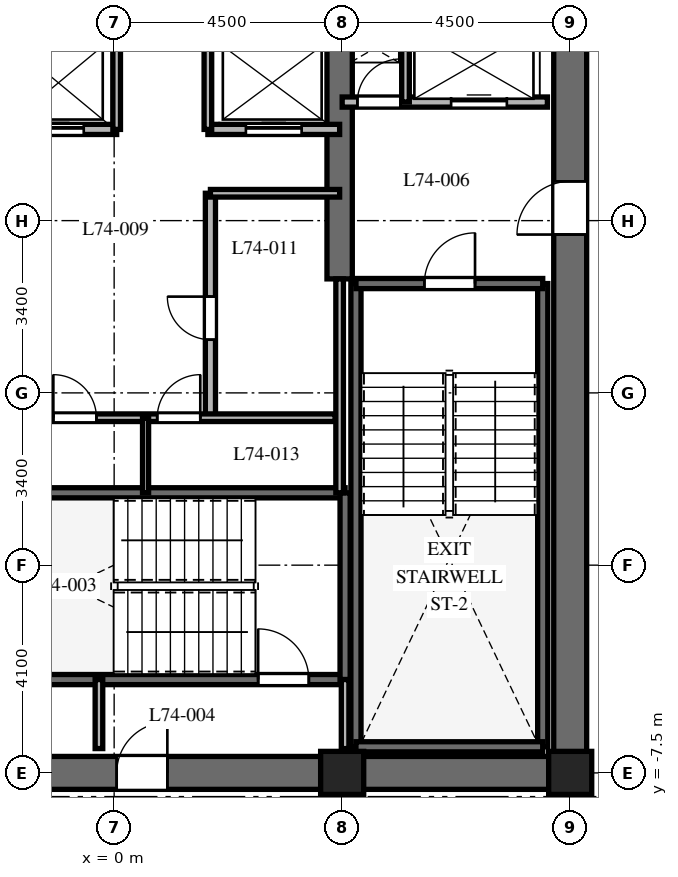
"""IFC4 building model, lengths in metres.
Left out: names, types, materials, properties, quantities, classifications, styles, units other than length and angle.
Written with IfcOpenShell. Run it as: python <this file> out.ifc"""

import sys

from ifc_helpers import new_model, si_unit, direction, frame, frame_2d, origin, origin_2d, place, context, subcontext, project, spatial, rectangle, extrude, element, fill, save


model = new_model("IFC4")
c1 = context("Model", 3, precision=1e-05, world=origin(), true_north=direction((0.0, 1.0)))
c2 = subcontext(c1, "Body", "Model", "MODEL_VIEW")
j1 = project(units=[si_unit("LENGTHUNIT", "METRE"), si_unit("PLANEANGLEUNIT", "RADIAN")], contexts=[c1])
p1 = place(None, origin())
s1 = spatial("IfcSite", under=j1, at=p1, CompositionType="ELEMENT")
p2 = place(p1, origin())
s2 = spatial("IfcBuilding", under=s1, at=p2, CompositionType="ELEMENT")
p3 = place(p2, frame((0.0, 0.0, 297.6)))
s3 = spatial("IfcBuildingStorey", under=s2, at=p3, CompositionType="ELEMENT", Elevation=297.6)
p4 = place(p3, frame((-9.325, -7.5, 0.0), z_axis=(0.0, 0.0, 1.0), x_axis=(1.0, 0.0, 0.0)))
e1 = element("IfcWall", 1, at=p4, inside=s3, PredefinedType="SHEAR", context=c2, shape_type="SweptSolid", body=[
    extrude(rectangle(XDim=18.65, YDim=0.65, at=frame_2d((9.325, 0.0))), origin(), (0.0, 0.0, 1.0), 3.9),
])
p5 = place(p4, frame((9.375, 0.0, 0.0)))
e2 = element("IfcOpeningElement", 2, at=p5, cuts=e1, PredefinedType="OPENING", context=c2, shape_type="SweptSolid", body=[
    extrude(rectangle(XDim=1.0, YDim=2.15, at=frame_2d((0.5, 1.075))), frame((0.0, 0.335, 0.0), z_axis=(0.0, -1.0, 0.0), x_axis=(1.0, 0.0, 0.0)), (0.0, 0.0, 1.0), 0.67),
])
p6 = place(p3, frame((9.0, -7.175, 0.0), z_axis=(0.0, 0.0, 1.0), x_axis=(0.0, 1.0, 0.0)))
e3 = element("IfcWall", 3, at=p6, inside=s3, PredefinedType="SHEAR", context=c2, shape_type="SweptSolid", body=[
    extrude(rectangle(XDim=14.35, YDim=0.65, at=frame_2d((7.175, 0.0))), origin(), (0.0, 0.0, 1.0), 3.9),
])
p7 = place(p6, frame((10.3, 0.0, 0.0)))
e4 = element("IfcOpeningElement", 4, at=p7, cuts=e3, PredefinedType="OPENING", context=c2, shape_type="SweptSolid", body=[
    extrude(rectangle(XDim=1.05, YDim=2.15, at=frame_2d((0.525, 1.075))), frame((0.0, 0.335, 0.0), z_axis=(0.0, -1.0, 0.0), x_axis=(1.0, 0.0, 0.0)), (0.0, 0.0, 1.0), 0.67),
])
p8 = place(p3, frame((4.45, 2.25, 0.0), z_axis=(0.0, 0.0, 1.0), x_axis=(0.0, 1.0, 0.0)))
e5 = element("IfcWall", 5, at=p8, inside=s3, PredefinedType="SHEAR", context=c2, shape_type="SweptSolid", body=[
    extrude(rectangle(XDim=4.925, YDim=0.5, at=frame_2d((2.462, 0.0))), origin(), (0.0, 0.0, 1.0), 3.9),
])
for number, where, z_axis, x_axis in (
    (6, (4.772, -6.985, 0.0), (0.0, 0.0, 1.0), (0.0, 1.0, 0.0)),
    (7, (8.458, -6.985, 0.0), (0.0, 0.0, 1.0), (0.0, 1.0, 0.0)),
):
    element("IfcWall", number, at=place(p3, frame(where, z_axis=z_axis, x_axis=x_axis)), inside=s3, PredefinedType="SHEAR", context=c2, shape_type="SweptSolid", body=[
        extrude(rectangle(XDim=9.143, YDim=0.2, at=frame_2d((4.572, 0.0))), origin(), (0.0, 0.0, 1.0), 3.9),
    ])
p9 = place(p3, frame((4.772, -6.985, 0.0), z_axis=(0.0, 0.0, 1.0), x_axis=(1.0, 0.0, 0.0)))
e8 = element("IfcWall", 8, at=p9, inside=s3, PredefinedType="SHEAR", context=c2, shape_type="SweptSolid", body=[
    extrude(rectangle(XDim=3.686, YDim=0.2, at=frame_2d((1.843, 0.0))), origin(), (0.0, 0.0, 1.0), 3.9),
])
p10 = place(p3, frame((4.772, 2.158, 0.0), z_axis=(0.0, 0.0, 1.0), x_axis=(1.0, 0.0, 0.0)))
e9 = element("IfcWall", 9, at=p10, inside=s3, PredefinedType="SHEAR", context=c2, shape_type="SweptSolid", body=[
    extrude(rectangle(XDim=3.686, YDim=0.2, at=frame_2d((1.843, 0.0))), origin(), (0.0, 0.0, 1.0), 3.9),
])
p11 = place(p10, frame((1.35, 0.0, 0.0)))
e10 = element("IfcOpeningElement", 10, at=p11, cuts=e9, PredefinedType="OPENING", context=c2, shape_type="SweptSolid", body=[
    extrude(rectangle(XDim=1.0, YDim=2.15, at=frame_2d((0.5, 1.075))), frame((0.0, 0.11, 0.0), z_axis=(0.0, -1.0, 0.0), x_axis=(1.0, 0.0, 0.0)), (0.0, 0.0, 1.0), 0.22),
])
p12 = place(p3, frame((-4.608, -5.658, 0.0), z_axis=(0.0, 0.0, 1.0), x_axis=(1.0, 0.0, 0.0)))
e11 = element("IfcWall", 11, at=p12, inside=s3, PredefinedType="SHEAR", context=c2, shape_type="SweptSolid", body=[
    extrude(rectangle(XDim=9.166, YDim=0.2, at=frame_2d((4.583, 0.0))), origin(), (0.0, 0.0, 1.0), 3.9),
])
p13 = place(p12, frame((7.45, 0.0, 0.0)))
e12 = element("IfcOpeningElement", 12, at=p13, cuts=e11, PredefinedType="OPENING", context=c2, shape_type="SweptSolid", body=[
    extrude(rectangle(XDim=1.0, YDim=2.15, at=frame_2d((0.5, 1.075))), frame((0.0, 0.11, 0.0), z_axis=(0.0, -1.0, 0.0), x_axis=(1.0, 0.0, 0.0)), (0.0, 0.0, 1.0), 0.22),
])
p14 = place(p3, frame((-4.608, -1.972, 0.0), z_axis=(0.0, 0.0, 1.0), x_axis=(1.0, 0.0, 0.0)))
e13 = element("IfcWall", 13, at=p14, inside=s3, PredefinedType="SHEAR", context=c2, shape_type="SweptSolid", body=[
    extrude(rectangle(XDim=9.166, YDim=0.2, at=frame_2d((4.583, 0.0))), origin(), (0.0, 0.0, 1.0), 3.9),
])
p15 = place(p3, frame((4.558, -5.658, 0.0), z_axis=(0.0, 0.0, 1.0), x_axis=(0.0, 1.0, 0.0)))
e14 = element("IfcWall", 14, at=p15, inside=s3, PredefinedType="SHEAR", context=c2, shape_type="SweptSolid", body=[
    extrude(rectangle(XDim=3.686, YDim=0.2, at=frame_2d((1.843, 0.0))), origin(), (0.0, 0.0, 1.0), 3.9),
])
for number, where, z_axis, x_axis in (
    (15, (4.5, -7.5, 0.0), (0.0, 0.0, 1.0), (1.0, 0.0, 0.0)),
    (16, (9.0, -7.5, 0.0), (0.0, 0.0, 1.0), (1.0, 0.0, 0.0)),
):
    element("IfcColumn", number, at=place(p3, frame(where, z_axis=z_axis, x_axis=x_axis)), inside=s3, PredefinedType="COLUMN", context=c2, shape_type="SweptSolid", body=[
        extrude(rectangle(XDim=0.85, YDim=0.85, at=origin_2d()), origin(), (0.0, 0.0, 1.0), 3.9),
    ])
for number, where, z_axis, x_axis in (
    (17, (-0.3, -7.02, 0.0), (0.0, 0.0, 1.0), (0.0, 1.0, 0.0)),
    (18, (4.558, -7.02, 0.0), (0.0, 0.0, 1.0), (0.0, 1.0, 0.0)),
):
    element("IfcWall", number, at=place(p3, frame(where, z_axis=z_axis, x_axis=x_axis)), inside=s3, PredefinedType="PARTITIONING", context=c2, shape_type="SweptSolid", body=[
        extrude(rectangle(XDim=1.362, YDim=0.15, at=frame_2d((0.681, 0.0))), origin(), (0.0, 0.0, 1.0), 3.6),
    ])
p16 = place(p3, frame((4.5, 5.74, 0.0), z_axis=(0.0, 0.0, 1.0), x_axis=(1.0, 0.0, 0.0)))
e19 = element("IfcWall", 19, at=p16, inside=s3, PredefinedType="PARTITIONING", context=c2, shape_type="SweptSolid", body=[
    extrude(rectangle(XDim=4.05, YDim=0.2, at=frame_2d((2.025, 0.0))), origin(), (0.0, 0.0, 1.0), 3.6),
])
p17 = place(p16, frame((0.3, 0.0, 0.0)))
e20 = element("IfcOpeningElement", 20, at=p17, cuts=e19, PredefinedType="OPENING", context=c2, shape_type="SweptSolid", body=[
    extrude(rectangle(XDim=0.85, YDim=2.03, at=frame_2d((0.425, 1.015))), frame((0.0, 0.11, 0.0), z_axis=(0.0, -1.0, 0.0), x_axis=(1.0, 0.0, 0.0)), (0.0, 0.0, 1.0), 0.22),
])
p18 = place(p16, frame((2.15, 0.0, 0.0)))
e21 = element("IfcOpeningElement", 21, at=p18, cuts=e19, PredefinedType="OPENING", context=c2, shape_type="SweptSolid", body=[
    extrude(rectangle(XDim=1.1, YDim=2.2, at=frame_2d((0.55, 1.1))), frame((0.0, 0.11, 0.0), z_axis=(0.0, -1.0, 0.0), x_axis=(1.0, 0.0, 0.0)), (0.0, 0.0, 1.0), 0.22),
])
p19 = place(p3, frame((5.75, 5.74, 0.0), z_axis=(0.0, 0.0, 1.0), x_axis=(0.0, 1.0, 0.0)))
e22 = element("IfcWall", 22, at=p19, inside=s3, PredefinedType="PARTITIONING", context=c2, shape_type="SweptSolid", body=[
    extrude(rectangle(XDim=1.41, YDim=0.15, at=frame_2d((0.705, 0.0))), origin(), (0.0, 0.0, 1.0), 3.6),
])
p20 = place(p3, frame((-4.45, 5.2, 0.0), z_axis=(0.0, 0.0, 1.0), x_axis=(1.0, 0.0, 0.0)))
e23 = element("IfcWall", 23, at=p20, inside=s3, PredefinedType="PARTITIONING", context=c2, shape_type="SweptSolid", body=[
    extrude(rectangle(XDim=4.5, YDim=0.2, at=frame_2d((2.25, 0.0))), origin(), (0.0, 0.0, 1.0), 3.6),
])
p21 = place(p20, frame((0.65, 0.0, 0.0)))
e24 = element("IfcOpeningElement", 24, at=p21, cuts=e23, PredefinedType="OPENING", context=c2, shape_type="SweptSolid", body=[
    extrude(rectangle(XDim=1.0, YDim=2.2, at=frame_2d((0.5, 1.1))), frame((0.0, 0.11, 0.0), z_axis=(0.0, -1.0, 0.0), x_axis=(1.0, 0.0, 0.0)), (0.0, 0.0, 1.0), 0.22),
])
p22 = place(p20, frame((2.85, 0.0, 0.0)))
e25 = element("IfcOpeningElement", 25, at=p22, cuts=e23, PredefinedType="OPENING", context=c2, shape_type="SweptSolid", body=[
    extrude(rectangle(XDim=1.0, YDim=2.2, at=frame_2d((0.5, 1.1))), frame((0.0, 0.11, 0.0), z_axis=(0.0, -1.0, 0.0), x_axis=(1.0, 0.0, 0.0)), (0.0, 0.0, 1.0), 0.22),
])
p23 = place(p3, frame((1.85, 5.2, 0.0), z_axis=(0.0, 0.0, 1.0), x_axis=(1.0, 0.0, 0.0)))
e26 = element("IfcWall", 26, at=p23, inside=s3, PredefinedType="PARTITIONING", context=c2, shape_type="SweptSolid", body=[
    extrude(rectangle(XDim=2.6, YDim=0.2, at=frame_2d((1.3, 0.0))), origin(), (0.0, 0.0, 1.0), 3.6),
])
p24 = place(p23, frame((0.75, 0.0, 0.0)))
e27 = element("IfcOpeningElement", 27, at=p24, cuts=e26, PredefinedType="OPENING", context=c2, shape_type="SweptSolid", body=[
    extrude(rectangle(XDim=1.1, YDim=2.2, at=frame_2d((0.55, 1.1))), frame((0.0, 0.11, 0.0), z_axis=(0.0, -1.0, 0.0), x_axis=(1.0, 0.0, 0.0)), (0.0, 0.0, 1.0), 0.22),
])
for number, where, z_axis, x_axis in (
    (28, (0.05, 5.2, 0.0), (0.0, 0.0, 1.0), (0.0, 1.0, 0.0)),
    (29, (1.85, 5.2, 0.0), (0.0, 0.0, 1.0), (0.0, 1.0, 0.0)),
):
    element("IfcWall", number, at=place(p3, frame(where, z_axis=z_axis, x_axis=x_axis)), inside=s3, PredefinedType="PARTITIONING", context=c2, shape_type="SweptSolid", body=[
        extrude(rectangle(XDim=1.95, YDim=0.15, at=frame_2d((0.975, 0.0))), origin(), (0.0, 0.0, 1.0), 3.6),
    ])
p25 = place(p3, frame((4.45, -1.972, 0.0), z_axis=(0.0, 0.0, 1.0), x_axis=(0.0, 1.0, 0.0)))
e30 = element("IfcWall", 30, at=p25, inside=s3, PredefinedType="PARTITIONING", context=c2, shape_type="SweptSolid", body=[
    extrude(rectangle(XDim=4.222, YDim=0.15, at=frame_2d((2.111, 0.0))), origin(), (0.0, 0.0, 1.0), 3.6),
])
p26 = place(p3, frame((1.9, -0.5, 0.0), z_axis=(0.0, 0.0, 1.0), x_axis=(0.0, 1.0, 0.0)))
e31 = element("IfcWall", 31, at=p26, inside=s3, PredefinedType="PARTITIONING", context=c2, shape_type="SweptSolid", body=[
    extrude(rectangle(XDim=4.44, YDim=0.2, at=frame_2d((2.22, 0.0))), origin(), (0.0, 0.0, 1.0), 3.6),
])
p27 = place(p26, frame((1.55, 0.0, 0.0)))
e32 = element("IfcOpeningElement", 32, at=p27, cuts=e31, PredefinedType="OPENING", context=c2, shape_type="SweptSolid", body=[
    extrude(rectangle(XDim=0.85, YDim=2.03, at=frame_2d((0.425, 1.015))), frame((0.0, 0.11, 0.0), z_axis=(0.0, -1.0, 0.0), x_axis=(1.0, 0.0, 0.0)), (0.0, 0.0, 1.0), 0.22),
])
p28 = place(p3, frame((1.9, 3.94, 0.0), z_axis=(0.0, 0.0, 1.0), x_axis=(1.0, 0.0, 0.0)))
e33 = element("IfcWall", 33, at=p28, inside=s3, PredefinedType="PARTITIONING", context=c2, shape_type="SweptSolid", body=[
    extrude(rectangle(XDim=2.55, YDim=0.15, at=frame_2d((1.275, 0.0))), origin(), (0.0, 0.0, 1.0), 3.6),
])
p29 = place(p3, frame((-4.36, -0.49, 0.0), z_axis=(0.0, 0.0, 1.0), x_axis=(1.0, 0.0, 0.0)))
e34 = element("IfcWall", 34, at=p29, inside=s3, PredefinedType="PARTITIONING", context=c2, shape_type="SweptSolid", body=[
    extrude(rectangle(XDim=8.72, YDim=0.15, at=frame_2d((4.36, 0.0))), origin(), (0.0, 0.0, 1.0), 3.6),
])
p30 = place(p29, frame((3.16, 0.0, 0.0)))
e35 = element("IfcOpeningElement", 35, at=p30, cuts=e34, PredefinedType="OPENING", context=c2, shape_type="SweptSolid", body=[
    extrude(rectangle(XDim=0.85, YDim=2.03, at=frame_2d((0.425, 1.015))), frame((0.0, 0.085, 0.0), z_axis=(0.0, -1.0, 0.0), x_axis=(1.0, 0.0, 0.0)), (0.0, 0.0, 1.0), 0.17),
])
p31 = place(p29, frame((5.21, 0.0, 0.0)))
e36 = element("IfcOpeningElement", 36, at=p31, cuts=e34, PredefinedType="OPENING", context=c2, shape_type="SweptSolid", body=[
    extrude(rectangle(XDim=0.85, YDim=2.03, at=frame_2d((0.425, 1.015))), frame((0.0, 0.085, 0.0), z_axis=(0.0, -1.0, 0.0), x_axis=(1.0, 0.0, 0.0)), (0.0, 0.0, 1.0), 0.17),
])
p32 = place(p3, frame((0.62, -1.972, 0.0), z_axis=(0.0, 0.0, 1.0), x_axis=(0.0, 1.0, 0.0)))
e37 = element("IfcWall", 37, at=p32, inside=s3, PredefinedType="PARTITIONING", context=c2, shape_type="SweptSolid", body=[
    extrude(rectangle(XDim=1.472, YDim=0.12, at=frame_2d((0.736, 0.0))), origin(), (0.0, 0.0, 1.0), 3.6),
])
p33 = place(p11, origin())
e38 = element("IfcDoor", 38, at=p33, inside=s3, OperationType="SINGLE_SWING_RIGHT", PredefinedType="DOOR", context=c2, shape_type="SweptSolid", body=[
    extrude(rectangle(XDim=1.0, YDim=2.15, at=frame_2d((0.5, 1.075))), frame((0.0, 0.025, 0.0), z_axis=(0.0, -1.0, 0.0), x_axis=(1.0, 0.0, 0.0)), (0.0, 0.0, 1.0), 0.05),
])
fill(e10, e38)
p34 = place(p13, origin())
e39 = element("IfcDoor", 39, at=p34, inside=s3, OperationType="SINGLE_SWING_LEFT", PredefinedType="DOOR", context=c2, shape_type="SweptSolid", body=[
    extrude(rectangle(XDim=1.0, YDim=2.15, at=frame_2d((0.5, 1.075))), frame((0.0, 0.025, 0.0), z_axis=(0.0, -1.0, 0.0), x_axis=(1.0, 0.0, 0.0)), (0.0, 0.0, 1.0), 0.05),
])
fill(e12, e39)
p35 = place(p5, origin())
e40 = element("IfcDoor", 40, at=p35, inside=s3, OperationType="SINGLE_SWING_RIGHT", PredefinedType="DOOR", context=c2, shape_type="SweptSolid", body=[
    extrude(rectangle(XDim=1.0, YDim=2.15, at=frame_2d((0.5, 1.075))), frame((0.0, 0.025, 0.0), z_axis=(0.0, -1.0, 0.0), x_axis=(1.0, 0.0, 0.0)), (0.0, 0.0, 1.0), 0.05),
])
fill(e2, e40)
p36 = place(p7, origin())
e41 = element("IfcDoor", 41, at=p36, inside=s3, OperationType="SINGLE_SWING_LEFT", PredefinedType="DOOR", context=c2, shape_type="SweptSolid", body=[
    extrude(rectangle(XDim=1.05, YDim=2.15, at=frame_2d((0.525, 1.075))), frame((0.0, 0.025, 0.0), z_axis=(0.0, -1.0, 0.0), x_axis=(1.0, 0.0, 0.0)), (0.0, 0.0, 1.0), 0.05),
])
fill(e4, e41)
p37 = place(p17, origin())
e42 = element("IfcDoor", 42, at=p37, inside=s3, OperationType="SINGLE_SWING_RIGHT", PredefinedType="DOOR", context=c2, shape_type="SweptSolid", body=[
    extrude(rectangle(XDim=0.85, YDim=2.03, at=frame_2d((0.425, 1.015))), frame((0.0, 0.025, 0.0), z_axis=(0.0, -1.0, 0.0), x_axis=(1.0, 0.0, 0.0)), (0.0, 0.0, 1.0), 0.05),
])
fill(e20, e42)
p38 = place(p18, origin())
e43 = element("IfcDoor", 43, at=p38, inside=s3, OperationType="SLIDING_TO_RIGHT", PredefinedType="DOOR", context=c2, shape_type="SweptSolid", body=[
    extrude(rectangle(XDim=1.1, YDim=2.2, at=frame_2d((0.55, 1.1))), frame((0.0, 0.025, 0.0), z_axis=(0.0, -1.0, 0.0), x_axis=(1.0, 0.0, 0.0)), (0.0, 0.0, 1.0), 0.05),
])
fill(e21, e43)
p39 = place(p22, origin())
e44 = element("IfcDoor", 44, at=p39, inside=s3, OperationType="SLIDING_TO_RIGHT", PredefinedType="DOOR", context=c2, shape_type="SweptSolid", body=[
    extrude(rectangle(XDim=1.0, YDim=2.2, at=frame_2d((0.5, 1.1))), frame((0.0, 0.025, 0.0), z_axis=(0.0, -1.0, 0.0), x_axis=(1.0, 0.0, 0.0)), (0.0, 0.0, 1.0), 0.05),
])
fill(e25, e44)
p40 = place(p24, origin())
e45 = element("IfcDoor", 45, at=p40, inside=s3, OperationType="SLIDING_TO_RIGHT", PredefinedType="DOOR", context=c2, shape_type="SweptSolid", body=[
    extrude(rectangle(XDim=1.1, YDim=2.2, at=frame_2d((0.55, 1.1))), frame((0.0, 0.025, 0.0), z_axis=(0.0, -1.0, 0.0), x_axis=(1.0, 0.0, 0.0)), (0.0, 0.0, 1.0), 0.05),
])
fill(e27, e45)
p41 = place(p27, origin())
e46 = element("IfcDoor", 46, at=p41, inside=s3, OperationType="SINGLE_SWING_RIGHT", PredefinedType="DOOR", context=c2, shape_type="SweptSolid", body=[
    extrude(rectangle(XDim=0.85, YDim=2.03, at=frame_2d((0.425, 1.015))), frame((0.0, 0.025, 0.0), z_axis=(0.0, -1.0, 0.0), x_axis=(1.0, 0.0, 0.0)), (0.0, 0.0, 1.0), 0.05),
])
fill(e32, e46)
p42 = place(p30, origin())
e47 = element("IfcDoor", 47, at=p42, inside=s3, OperationType="SINGLE_SWING_LEFT", PredefinedType="DOOR", context=c2, shape_type="SweptSolid", body=[
    extrude(rectangle(XDim=0.85, YDim=2.03, at=frame_2d((0.425, 1.015))), frame((0.0, 0.025, 0.0), z_axis=(0.0, -1.0, 0.0), x_axis=(1.0, 0.0, 0.0)), (0.0, 0.0, 1.0), 0.05),
])
fill(e35, e47)
p43 = place(p31, origin())
e48 = element("IfcDoor", 48, at=p43, inside=s3, OperationType="SINGLE_SWING_RIGHT", PredefinedType="DOOR", context=c2, shape_type="SweptSolid", body=[
    extrude(rectangle(XDim=0.85, YDim=2.03, at=frame_2d((0.425, 1.015))), frame((0.0, 0.025, 0.0), z_axis=(0.0, -1.0, 0.0), x_axis=(1.0, 0.0, 0.0)), (0.0, 0.0, 1.0), 0.05),
])
fill(e36, e48)
save(model, sys.argv[1])
